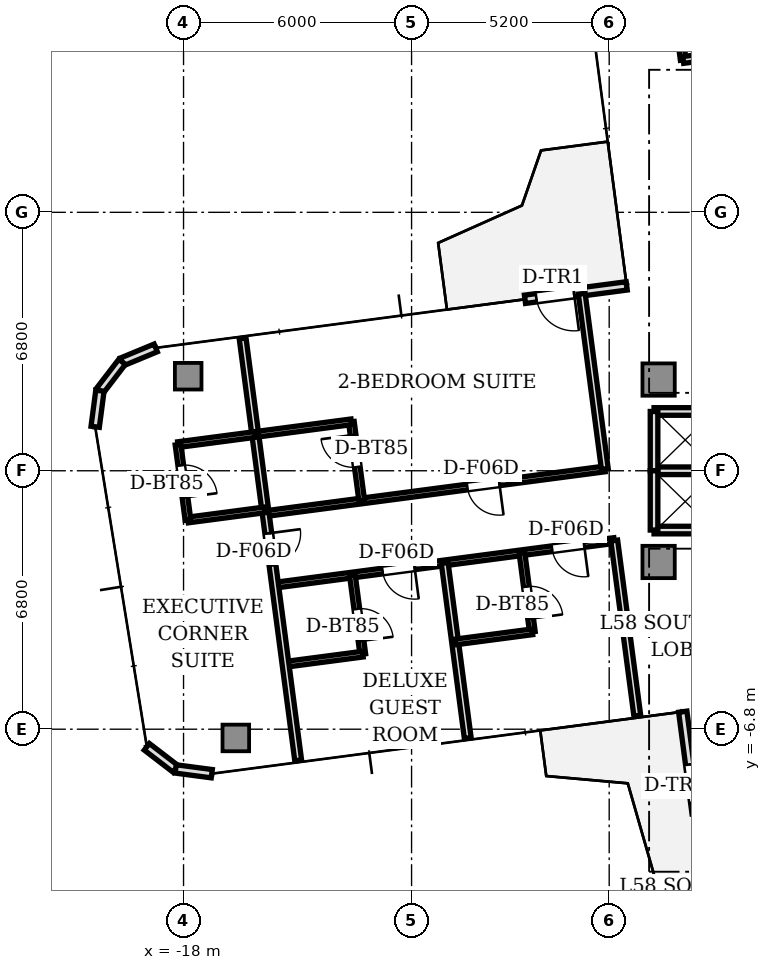
"""IFC4 building model, lengths in metres.
Left out: names, types, materials, properties, quantities, classifications, styles, units other than length and angle.
Written with IfcOpenShell. Run it as: python <this file> out.ifc"""

import sys

from ifc_helpers import new_model, si_unit, direction, frame, frame_2d, origin, origin_2d, place, context, subcontext, project, spatial, rectangle, extrude, source, transform, mapped, element, fill, save


model = new_model("IFC4")
c1 = context("Model", 3, precision=1e-05, world=origin(), true_north=direction((0.0, 1.0)))
c2 = subcontext(c1, "Body", "Model", "MODEL_VIEW")
j1 = project(units=[si_unit("LENGTHUNIT", "METRE"), si_unit("PLANEANGLEUNIT", "RADIAN")], contexts=[c1])
p1 = place(None, origin())
s1 = spatial("IfcSite", under=j1, at=p1, CompositionType="ELEMENT")
p2 = place(p1, origin())
s2 = spatial("IfcBuilding", under=s1, at=p2, CompositionType="ELEMENT")
p3 = place(p2, frame((0.0, 0.0, 209.85)))
s3 = spatial("IfcBuildingStorey", under=s2, at=p3, CompositionType="ELEMENT", Elevation=209.85)
m1 = source(origin(), c2, "Body", "SweptSolid", [
    extrude(rectangle(XDim=0.85, YDim=0.85, at=origin_2d()), origin(), (0.0, 0.0, 1.0), 3.11),
])
for number, where, z_axis, x_axis in (
    (1, (-5.5, 2.4, 0.0), (0.0, 0.0, 1.0), (1.0, 0.0, 0.0)),
    (2, (-5.5, -2.4, 0.0), (0.0, 0.0, 1.0), (1.0, 0.0, 0.0)),
):
    element("IfcColumn", number, at=place(p3, frame(where, z_axis=z_axis, x_axis=x_axis)), inside=s3, PredefinedType="COLUMN", context=c2, shape_type="MappedRepresentation", body=[
        mapped(m1, transform((0.0, 0.0, 0.0), scale=1.0)),
    ])
m2 = source(origin(), c2, "Body", "SweptSolid", [
    extrude(rectangle(XDim=0.7, YDim=0.7, at=origin_2d()), origin(), (0.0, 0.0, 1.0), 3.11),
])
for number, where, z_axis, x_axis in (
    (3, (-17.878, 2.488, 0.0), (0.0, 0.0, 1.0), (1.0, 0.0, 0.0)),
    (4, (-16.625, -7.03, 0.0), (0.0, 0.0, 1.0), (1.0, 0.0, 0.0)),
):
    element("IfcColumn", number, at=place(p3, frame(where, z_axis=z_axis, x_axis=x_axis)), inside=s3, PredefinedType="COLUMN", context=c2, shape_type="MappedRepresentation", body=[
        mapped(m2, transform((0.0, 0.0, 0.0), scale=1.0)),
    ])
p4 = place(p3, frame((-6.339, 4.864, 0.0), z_axis=(0.0, 0.0, 1.0), x_axis=(-0.991439824936, -0.130564442062, 0.0)))
e5 = element("IfcWall", 5, at=p4, inside=s3, PredefinedType="STANDARD", context=c2, shape_type="SweptSolid", body=[
    extrude(rectangle(XDim=2.7, YDim=0.22, at=frame_2d((1.35, 0.0))), origin(), (0.0, 0.0, 1.0), 3.11),
])
p5 = place(p4, frame((1.4, 0.0, 0.0)))
e6 = element("IfcOpeningElement", 6, at=p5, cuts=e5, PredefinedType="OPENING", context=c2, shape_type="SweptSolid", body=[
    extrude(rectangle(XDim=1.0, YDim=2.2, at=frame_2d((0.5, 1.1))), frame((0.0, 0.12, 0.0), z_axis=(0.0, -1.0, 0.0), x_axis=(1.0, 0.0, 0.0)), (0.0, 0.0, 1.0), 0.24),
])
for number, where, z_axis, x_axis in (
    (7, (-18.732, 3.233, 0.0), (0.0, 0.0, 1.0), (-0.924, -0.383, 0.0)),
    (8, (-19.617, 2.866, 0.0), (0.0, 0.0, 1.0), (-0.609, -0.793, 0.0)),
    (9, (-20.2, 2.106, 0.0), (0.0, 0.0, 1.0), (-0.131, -0.991, 0.0)),
):
    element("IfcWall", number, at=place(p3, frame(where, z_axis=z_axis, x_axis=x_axis)), inside=s3, PredefinedType="STANDARD", context=c2, shape_type="SweptSolid", body=[
        extrude(rectangle(XDim=0.958, YDim=0.22, at=frame_2d((0.479, 0.0))), origin(), (0.0, 0.0, 1.0), 3.11),
    ])
p6 = place(p3, frame((-18.966, -7.263, 0.0), z_axis=(0.0, 0.0, 1.0), x_axis=(0.793249178392, -0.608897151398, 0.0)))
e10 = element("IfcWall", 10, at=p6, inside=s3, PredefinedType="STANDARD", context=c2, shape_type="SweptSolid", body=[
    extrude(rectangle(XDim=0.958, YDim=0.22, at=frame_2d((0.479, 0.0))), origin(), (0.0, 0.0, 1.0), 3.11),
])
p7 = place(p3, frame((-18.207, -7.846, 0.0), z_axis=(0.0, 0.0, 1.0), x_axis=(0.991444747987, -0.130527053476, 0.0)))
e11 = element("IfcWall", 11, at=p7, inside=s3, PredefinedType="STANDARD", context=c2, shape_type="SweptSolid", body=[
    extrude(rectangle(XDim=0.958, YDim=0.22, at=frame_2d((0.479, 0.0))), origin(), (0.0, 0.0, 1.0), 3.11),
])
p8 = place(p3, frame((-4.864, -6.339, 0.0), z_axis=(0.0, 0.0, 1.0), x_axis=(0.130564442062, -0.991439824936, 0.0)))
e12 = element("IfcWall", 12, at=p8, inside=s3, PredefinedType="STANDARD", context=c2, shape_type="SweptSolid", body=[
    extrude(rectangle(XDim=2.7, YDim=0.22, at=frame_2d((1.35, 0.0))), origin(), (0.0, 0.0, 1.0), 3.11),
])
p9 = place(p8, frame((1.4, 0.0, 0.0)))
e13 = element("IfcOpeningElement", 13, at=p9, cuts=e12, PredefinedType="OPENING", context=c2, shape_type="SweptSolid", body=[
    extrude(rectangle(XDim=1.0, YDim=2.2, at=frame_2d((0.5, 1.1))), frame((0.0, 0.12, 0.0), z_axis=(0.0, -1.0, 0.0), x_axis=(1.0, 0.0, 0.0)), (0.0, 0.0, 1.0), 0.24),
])
for number, where, z_axis, x_axis in (
    (14, (-5.62, 1.56, 0.0), (0.0, 0.0, 1.0), (1.0, 0.0, 0.0)),
    (15, (-5.62, -1.56, 0.0), (0.0, 0.0, 1.0), (1.0, 0.0, 0.0)),
    (16, (-5.62, 0.0, 0.0), (0.0, 0.0, 1.0), (1.0, 0.0, 0.0)),
):
    element("IfcWall", number, at=place(p3, frame(where, z_axis=z_axis, x_axis=x_axis)), inside=s3, PredefinedType="SOLIDWALL", context=c2, shape_type="SweptSolid", body=[
        extrude(rectangle(XDim=1.64, YDim=0.2, at=frame_2d((0.82, 0.0))), origin(), (0.0, 0.0, 1.0), 2.66),
    ])
for number, where, z_axis, x_axis in (
    (17, (-5.62, 0.0, 0.0), (0.0, 0.0, 1.0), (0.0, 1.0, 0.0)),
    (18, (-5.62, -1.56, 0.0), (0.0, 0.0, 1.0), (0.0, 1.0, 0.0)),
):
    element("IfcWall", number, at=place(p3, frame(where, z_axis=z_axis, x_axis=x_axis)), inside=s3, PredefinedType="SOLIDWALL", context=c2, shape_type="SweptSolid", body=[
        extrude(rectangle(XDim=1.56, YDim=0.2, at=frame_2d((0.78, 0.0))), origin(), (0.0, 0.0, 1.0), 2.66),
    ])
p10 = place(p3, frame((-4.852, 10.809, 0.0), z_axis=(0.0, 0.0, 1.0), x_axis=(-0.130536051723, 0.991443563296, 0.0)))
e19 = element("IfcWall", 19, at=p10, inside=s3, PredefinedType="PARTITIONING", context=c2, shape_type="SweptSolid", body=[
    extrude(rectangle(XDim=3.95, YDim=0.15, at=frame_2d((1.975, 0.0))), origin(), (0.0, 0.0, 1.0), 2.66),
])
p11 = place(p10, frame((0.434, 0.0, 0.0)))
e20 = element("IfcOpeningElement", 20, at=p11, cuts=e19, PredefinedType="OPENING", context=c2, shape_type="SweptSolid", body=[
    extrude(rectangle(XDim=0.85, YDim=2.1, at=frame_2d((0.425, 1.05))), frame((0.0, 0.085, 0.0), z_axis=(0.0, -1.0, 0.0), x_axis=(1.0, 0.0, 0.0)), (0.0, 0.0, 1.0), 0.17),
])
p12 = place(p10, frame((2.408, 0.0, 0.0)))
e21 = element("IfcOpeningElement", 21, at=p12, cuts=e19, PredefinedType="OPENING", context=c2, shape_type="SweptSolid", body=[
    extrude(rectangle(XDim=0.85, YDim=2.1, at=frame_2d((0.425, 1.05))), frame((0.0, 0.085, 0.0), z_axis=(0.0, -1.0, 0.0), x_axis=(1.0, 0.0, 0.0)), (0.0, 0.0, 1.0), 0.17),
])
p13 = place(p3, frame((4.071, 11.984, 0.0), z_axis=(0.0, 0.0, 1.0), x_axis=(-0.99144358168, -0.130535912089, 0.0)))
e22 = element("IfcWall", 22, at=p13, inside=s3, PredefinedType="PARTITIONING", context=c2, shape_type="SweptSolid", body=[
    extrude(rectangle(XDim=9.0, YDim=0.18, at=frame_2d((4.5, 0.0))), origin(), (0.0, 0.0, 1.0), 2.66),
])
p14 = place(p3, frame((-6.667, -1.836, 0.0), z_axis=(0.0, 0.0, 1.0), x_axis=(-0.99144358168, -0.130535912089, 0.0)))
e23 = element("IfcWall", 23, at=p14, inside=s3, PredefinedType="PARTITIONING", context=c2, shape_type="SweptSolid", body=[
    extrude(rectangle(XDim=9.0, YDim=0.15, at=frame_2d((4.5, 0.0))), origin(), (0.0, 0.0, 1.0), 2.66),
])
p15 = place(p14, frame((0.8, 0.0, 0.0)))
e24 = element("IfcOpeningElement", 24, at=p15, cuts=e23, PredefinedType="OPENING", context=c2, shape_type="SweptSolid", body=[
    extrude(rectangle(XDim=0.85, YDim=2.1, at=frame_2d((0.425, 1.05))), frame((0.0, 0.085, 0.0), z_axis=(0.0, -1.0, 0.0), x_axis=(1.0, 0.0, 0.0)), (0.0, 0.0, 1.0), 0.17),
])
p16 = place(p14, frame((5.3, 0.0, 0.0)))
e25 = element("IfcOpeningElement", 25, at=p16, cuts=e23, PredefinedType="OPENING", context=c2, shape_type="SweptSolid", body=[
    extrude(rectangle(XDim=0.85, YDim=2.1, at=frame_2d((0.425, 1.05))), frame((0.0, 0.085, 0.0), z_axis=(0.0, -1.0, 0.0), x_axis=(1.0, 0.0, 0.0)), (0.0, 0.0, 1.0), 0.17),
])
p17 = place(p3, frame((-6.915, 0.048, 0.0), z_axis=(0.0, 0.0, 1.0), x_axis=(-0.991444043898, -0.130532401413, 0.0)))
e26 = element("IfcWall", 26, at=p17, inside=s3, PredefinedType="PARTITIONING", context=c2, shape_type="SweptSolid", body=[
    extrude(rectangle(XDim=9.0, YDim=0.15, at=frame_2d((4.5, 0.0))), origin(), (0.0, 0.0, 1.0), 2.66),
])
p18 = place(p17, frame((2.8, 0.0, 0.0)))
e27 = element("IfcOpeningElement", 27, at=p18, cuts=e26, PredefinedType="OPENING", context=c2, shape_type="SweptSolid", body=[
    extrude(rectangle(XDim=0.85, YDim=2.1, at=frame_2d((0.425, 1.05))), frame((0.0, 0.085, 0.0), z_axis=(0.0, -1.0, 0.0), x_axis=(1.0, 0.0, 0.0)), (0.0, 0.0, 1.0), 0.17),
])
p19 = place(p3, frame((-6.667, -1.836, 0.0), z_axis=(0.0, 0.0, 1.0), x_axis=(0.13051970184, -0.991445715827, 0.0)))
e28 = element("IfcWall", 28, at=p19, inside=s3, PredefinedType="PARTITIONING", context=c2, shape_type="SweptSolid", body=[
    extrude(rectangle(XDim=4.65, YDim=0.18, at=frame_2d((2.325, 0.0))), origin(), (0.0, 0.0, 1.0), 2.66),
])
p20 = place(p3, frame((-7.522, 4.658, 0.0), z_axis=(0.0, 0.0, 1.0), x_axis=(0.130526496103, -0.991444821367, 0.0)))
e29 = element("IfcWall", 29, at=p20, inside=s3, PredefinedType="PARTITIONING", context=c2, shape_type="SweptSolid", body=[
    extrude(rectangle(XDim=4.65, YDim=0.18, at=frame_2d((2.325, 0.0))), origin(), (0.0, 0.0, 1.0), 2.66),
])
p21 = place(p3, frame((-11.129, -2.423, 0.0), z_axis=(0.0, 0.0, 1.0), x_axis=(0.13051970184, -0.991445715827, 0.0)))
e30 = element("IfcWall", 30, at=p21, inside=s3, PredefinedType="PARTITIONING", context=c2, shape_type="SweptSolid", body=[
    extrude(rectangle(XDim=4.65, YDim=0.18, at=frame_2d((2.325, 0.0))), origin(), (0.0, 0.0, 1.0), 2.66),
])
p22 = place(p3, frame((-9.096, -2.156, 0.0), z_axis=(0.0, 0.0, 1.0), x_axis=(0.130556761174, -0.991440836415, 0.0)))
e31 = element("IfcWall", 31, at=p22, inside=s3, PredefinedType="PARTITIONING", context=c2, shape_type="SweptSolid", body=[
    extrude(rectangle(XDim=2.1, YDim=0.15, at=frame_2d((1.05, 0.0))), origin(), (0.0, 0.0, 1.0), 2.66),
])
p23 = place(p22, frame((0.9, 0.0, 0.0)))
e32 = element("IfcOpeningElement", 32, at=p23, cuts=e31, PredefinedType="OPENING", context=c2, shape_type="SweptSolid", body=[
    extrude(rectangle(XDim=0.85, YDim=2.1, at=frame_2d((0.425, 1.05))), frame((0.0, 0.085, 0.0), z_axis=(0.0, -1.0, 0.0), x_axis=(1.0, 0.0, 0.0)), (0.0, 0.0, 1.0), 0.17),
])
p24 = place(p3, frame((-8.822, -4.238, 0.0), z_axis=(0.0, 0.0, 1.0), x_axis=(-0.991444969909, -0.13052536781, 0.0)))
e33 = element("IfcWall", 33, at=p24, inside=s3, PredefinedType="PARTITIONING", context=c2, shape_type="SweptSolid", body=[
    extrude(rectangle(XDim=2.05, YDim=0.15, at=frame_2d((1.025, 0.0))), origin(), (0.0, 0.0, 1.0), 2.66),
])
p25 = place(p3, frame((-13.558, -2.743, 0.0), z_axis=(0.0, 0.0, 1.0), x_axis=(0.130556761174, -0.991440836415, 0.0)))
e34 = element("IfcWall", 34, at=p25, inside=s3, PredefinedType="PARTITIONING", context=c2, shape_type="SweptSolid", body=[
    extrude(rectangle(XDim=2.1, YDim=0.15, at=frame_2d((1.05, 0.0))), origin(), (0.0, 0.0, 1.0), 2.66),
])
p26 = place(p25, frame((0.9, 0.0, 0.0)))
e35 = element("IfcOpeningElement", 35, at=p26, cuts=e34, PredefinedType="OPENING", context=c2, shape_type="SweptSolid", body=[
    extrude(rectangle(XDim=0.85, YDim=2.1, at=frame_2d((0.425, 1.05))), frame((0.0, 0.085, 0.0), z_axis=(0.0, -1.0, 0.0), x_axis=(1.0, 0.0, 0.0)), (0.0, 0.0, 1.0), 0.17),
])
p27 = place(p3, frame((-13.284, -4.825, 0.0), z_axis=(0.0, 0.0, 1.0), x_axis=(-0.991446998513, -0.130509958008, 0.0)))
e36 = element("IfcWall", 36, at=p27, inside=s3, PredefinedType="PARTITIONING", context=c2, shape_type="SweptSolid", body=[
    extrude(rectangle(XDim=2.05, YDim=0.15, at=frame_2d((1.025, 0.0))), origin(), (0.0, 0.0, 1.0), 2.66),
])
p28 = place(p3, frame((-13.31, -0.794, 0.0), z_axis=(0.0, 0.0, 1.0), x_axis=(-0.13044248305, 0.9914558783, 0.0)))
e37 = element("IfcWall", 37, at=p28, inside=s3, PredefinedType="PARTITIONING", context=c2, shape_type="SweptSolid", body=[
    extrude(rectangle(XDim=2.1, YDim=0.15, at=frame_2d((1.05, 0.0))), origin(), (0.0, 0.0, 1.0), 2.66),
])
p29 = place(p28, frame((0.9, 0.0, 0.0)))
e38 = element("IfcOpeningElement", 38, at=p29, cuts=e37, PredefinedType="OPENING", context=c2, shape_type="SweptSolid", body=[
    extrude(rectangle(XDim=0.85, YDim=2.1, at=frame_2d((0.425, 1.05))), frame((0.0, 0.085, 0.0), z_axis=(0.0, -1.0, 0.0), x_axis=(1.0, 0.0, 0.0)), (0.0, 0.0, 1.0), 0.17),
])
p30 = place(p3, frame((-13.584, 1.288, 0.0), z_axis=(0.0, 0.0, 1.0), x_axis=(-0.99144973294, -0.130489183661, 0.0)))
e39 = element("IfcWall", 39, at=p30, inside=s3, PredefinedType="PARTITIONING", context=c2, shape_type="SweptSolid", body=[
    extrude(rectangle(XDim=2.55, YDim=0.15, at=frame_2d((1.275, 0.0))), origin(), (0.0, 0.0, 1.0), 2.66),
])
p31 = place(p3, frame((-16.445, 3.483, 0.0), z_axis=(0.0, 0.0, 1.0), x_axis=(0.130527251821, -0.991444721874, 0.0)))
e40 = element("IfcWall", 40, at=p31, inside=s3, PredefinedType="PARTITIONING", context=c2, shape_type="SweptSolid", body=[
    extrude(rectangle(XDim=11.2, YDim=0.18, at=frame_2d((5.6, 0.0))), origin(), (0.0, 0.0, 1.0), 2.66),
])
p32 = place(p31, frame((5.175, 0.0, 0.0)))
e41 = element("IfcOpeningElement", 41, at=p32, cuts=e40, PredefinedType="OPENING", context=c2, shape_type="SweptSolid", body=[
    extrude(rectangle(XDim=0.85, YDim=2.1, at=frame_2d((0.425, 1.05))), frame((0.0, 0.1, 0.0), z_axis=(0.0, -1.0, 0.0), x_axis=(1.0, 0.0, 0.0)), (0.0, 0.0, 1.0), 0.2),
])
p33 = place(p3, frame((-15.852, -1.028, 0.0), z_axis=(0.0, 0.0, 1.0), x_axis=(-0.991442940586, -0.130540781221, 0.0)))
e42 = element("IfcWall", 42, at=p33, inside=s3, PredefinedType="PARTITIONING", context=c2, shape_type="SweptSolid", body=[
    extrude(rectangle(XDim=2.05, YDim=0.15, at=frame_2d((1.025, 0.0))), origin(), (0.0, 0.0, 1.0), 2.66),
])
p34 = place(p3, frame((-16.113, 0.955, 0.0), z_axis=(0.0, 0.0, 1.0), x_axis=(-0.991444969909, -0.13052536781, 0.0)))
e43 = element("IfcWall", 43, at=p34, inside=s3, PredefinedType="PARTITIONING", context=c2, shape_type="SweptSolid", body=[
    extrude(rectangle(XDim=2.05, YDim=0.15, at=frame_2d((1.025, 0.0))), origin(), (0.0, 0.0, 1.0), 2.66),
])
p35 = place(p3, frame((-18.145, 0.688, 0.0), z_axis=(0.0, 0.0, 1.0), x_axis=(0.130612392842, -0.991433509034, 0.0)))
e44 = element("IfcWall", 44, at=p35, inside=s3, PredefinedType="PARTITIONING", context=c2, shape_type="SweptSolid", body=[
    extrude(rectangle(XDim=2.0, YDim=0.15, at=frame_2d((1.0, 0.0))), origin(), (0.0, 0.0, 1.0), 2.66),
])
p36 = place(p35, frame((0.55, 0.0, 0.0)))
e45 = element("IfcOpeningElement", 45, at=p36, cuts=e44, PredefinedType="OPENING", context=c2, shape_type="SweptSolid", body=[
    extrude(rectangle(XDim=0.85, YDim=2.1, at=frame_2d((0.425, 1.05))), frame((0.0, 0.085, 0.0), z_axis=(0.0, -1.0, 0.0), x_axis=(1.0, 0.0, 0.0)), (0.0, 0.0, 1.0), 0.17),
])
m3 = source(origin(), c2, "Body", "SweptSolid", [
    extrude(rectangle(XDim=1.0, YDim=0.05, at=origin_2d()), origin(), (0.0, 0.0, 1.0), 2.2),
])
p37 = place(p5, frame((0.5, 0.0, 0.0)))
e46 = element("IfcDoor", 46, at=p37, inside=s3, OperationType="SINGLE_SWING_LEFT", PredefinedType="DOOR", context=c2, shape_type="MappedRepresentation", body=[
    mapped(m3, transform((0.0, 0.0, 0.0), scale=1.0)),
])
fill(e6, e46)
p38 = place(p9, frame((0.5, 0.0, 0.0)))
e47 = element("IfcDoor", 47, at=p38, inside=s3, OperationType="SINGLE_SWING_LEFT", PredefinedType="DOOR", context=c2, shape_type="MappedRepresentation", body=[
    mapped(m3, transform((0.0, 0.0, 0.0), scale=1.0)),
])
fill(e13, e47)
m4 = source(origin(), c2, "Body", "SweptSolid", [
    extrude(rectangle(XDim=0.85, YDim=0.05, at=origin_2d()), origin(), (0.0, 0.0, 1.0), 2.1),
])
p39 = place(p23, frame((0.425, 0.0, 0.0)))
e48 = element("IfcDoor", 48, at=p39, inside=s3, OperationType="SINGLE_SWING_RIGHT", PredefinedType="DOOR", context=c2, shape_type="MappedRepresentation", body=[
    mapped(m4, transform((0.0, 0.0, 0.0), scale=1.0)),
])
fill(e32, e48)
p40 = place(p15, frame((0.425, 0.0, 0.0)))
e49 = element("IfcDoor", 49, at=p40, inside=s3, OperationType="SINGLE_SWING_LEFT", PredefinedType="DOOR", context=c2, shape_type="MappedRepresentation", body=[
    mapped(m4, transform((0.0, 0.0, 0.0), scale=1.0)),
])
fill(e24, e49)
p41 = place(p26, frame((0.425, 0.0, 0.0)))
e50 = element("IfcDoor", 50, at=p41, inside=s3, OperationType="SINGLE_SWING_RIGHT", PredefinedType="DOOR", context=c2, shape_type="MappedRepresentation", body=[
    mapped(m4, transform((0.0, 0.0, 0.0), scale=1.0)),
])
fill(e35, e50)
p42 = place(p16, frame((0.425, 0.0, 0.0)))
e51 = element("IfcDoor", 51, at=p42, inside=s3, OperationType="SINGLE_SWING_LEFT", PredefinedType="DOOR", context=c2, shape_type="MappedRepresentation", body=[
    mapped(m4, transform((0.0, 0.0, 0.0), scale=1.0)),
])
fill(e25, e51)
p43 = place(p29, frame((0.425, 0.0, 0.0)))
e52 = element("IfcDoor", 52, at=p43, inside=s3, OperationType="SINGLE_SWING_RIGHT", PredefinedType="DOOR", context=c2, shape_type="MappedRepresentation", body=[
    mapped(m4, transform((0.0, 0.0, 0.0), scale=1.0)),
])
fill(e38, e52)
p44 = place(p18, frame((0.425, 0.0, 0.0)))
e53 = element("IfcDoor", 53, at=p44, inside=s3, OperationType="SINGLE_SWING_LEFT", PredefinedType="DOOR", context=c2, shape_type="MappedRepresentation", body=[
    mapped(m4, transform((0.0, 0.0, 0.0), scale=1.0)),
])
fill(e27, e53)
p45 = place(p36, frame((0.425, 0.0, 0.0)))
e54 = element("IfcDoor", 54, at=p45, inside=s3, OperationType="SINGLE_SWING_RIGHT", PredefinedType="DOOR", context=c2, shape_type="MappedRepresentation", body=[
    mapped(m4, transform((0.0, 0.0, 0.0), scale=1.0)),
])
fill(e45, e54)
p46 = place(p32, frame((0.425, 0.0, 0.0)))
e55 = element("IfcDoor", 55, at=p46, inside=s3, OperationType="SINGLE_SWING_LEFT", PredefinedType="DOOR", context=c2, shape_type="MappedRepresentation", body=[
    mapped(m4, transform((0.0, 0.0, 0.0), scale=1.0)),
])
fill(e41, e55)
save(model, sys.argv[1])
